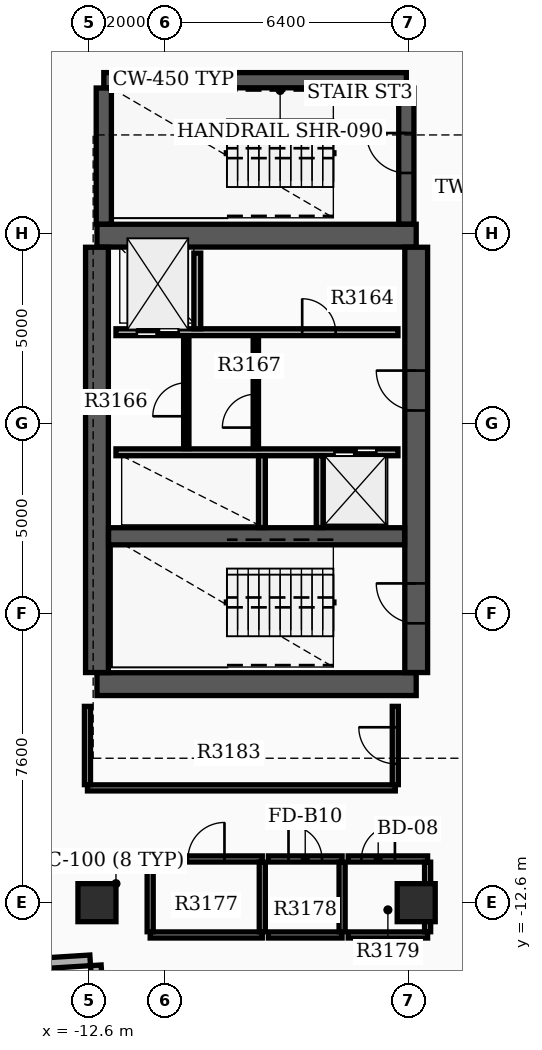
"""IFC4 building model, lengths in metres.
Left out: names, types, materials, properties, quantities, classifications, styles, units other than length and angle.
Written with IfcOpenShell. Run it as: python <this file> out.ifc"""

import sys

from ifc_helpers import new_model, si_unit, direction, frame, frame_2d, origin, origin_2d, place, context, subcontext, project, spatial, rectangle, extrude, element, fill, save


model = new_model("IFC4")
c1 = context("Model", 3, precision=1e-05, world=origin(), true_north=direction((0.0, 1.0)))
c2 = subcontext(c1, "Body", "Model", "MODEL_VIEW")
j1 = project(units=[si_unit("LENGTHUNIT", "METRE"), si_unit("PLANEANGLEUNIT", "RADIAN")], contexts=[c1])
p1 = place(None, origin())
s1 = spatial("IfcSite", under=j1, at=p1, CompositionType="ELEMENT")
p2 = place(p1, origin())
s2 = spatial("IfcBuilding", under=s1, at=p2, CompositionType="ELEMENT")
p3 = place(p2, frame((0.0, 0.0, 201.3)))
s3 = spatial("IfcBuildingStorey", under=s2, at=p3, CompositionType="ELEMENT", Elevation=201.3)
for number, where, z_axis, x_axis in (
    (1, (-12.4, -6.85, 0.0), (0.0, 0.0, 1.0), (1.0, 0.0, 0.0)),
    (2, (-12.4, 4.95, 0.0), (0.0, 0.0, 1.0), (1.0, 0.0, 0.0)),
):
    element("IfcWall", number, at=place(p3, frame(where, z_axis=z_axis, x_axis=x_axis)), inside=s3, PredefinedType="SHEAR", context=c2, shape_type="SweptSolid", body=[
        extrude(rectangle(XDim=8.4, YDim=0.6, at=frame_2d((4.2, 0.0))), origin(), (0.0, 0.0, 1.0), 3.7),
    ])
p4 = place(p3, frame((-12.4, -6.545, 0.0), z_axis=(0.0, 0.0, 1.0), x_axis=(0.0, 1.0, 0.0)))
e3 = element("IfcWall", 3, at=p4, inside=s3, PredefinedType="SHEAR", context=c2, shape_type="SweptSolid", body=[
    extrude(rectangle(XDim=11.19, YDim=0.6, at=frame_2d((5.595, 0.0))), origin(), (0.0, 0.0, 1.0), 3.7),
])
p5 = place(p3, frame((-4.0, -6.545, 0.0), z_axis=(0.0, 0.0, 1.0), x_axis=(0.0, 1.0, 0.0)))
e4 = element("IfcWall", 4, at=p5, inside=s3, PredefinedType="SHEAR", context=c2, shape_type="SweptSolid", body=[
    extrude(rectangle(XDim=11.19, YDim=0.6, at=frame_2d((5.595, 0.0))), origin(), (0.0, 0.0, 1.0), 3.7),
])
p6 = place(p5, frame((1.295, 0.0, 0.0)))
e5 = element("IfcOpeningElement", 5, at=p6, cuts=e4, PredefinedType="OPENING", context=c2, shape_type="SweptSolid", body=[
    extrude(rectangle(XDim=1.05, YDim=2.15, at=frame_2d((0.525, 1.075))), frame((0.0, 0.31, 0.0), z_axis=(0.0, -1.0, 0.0), x_axis=(1.0, 0.0, 0.0)), (0.0, 0.0, 1.0), 0.62),
])
p7 = place(p5, frame((6.895, 0.0, 0.0)))
e6 = element("IfcOpeningElement", 6, at=p7, cuts=e4, PredefinedType="OPENING", context=c2, shape_type="SweptSolid", body=[
    extrude(rectangle(XDim=1.05, YDim=2.15, at=frame_2d((0.525, 1.075))), frame((0.0, 0.31, 0.0), z_axis=(0.0, -1.0, 0.0), x_axis=(1.0, 0.0, 0.0)), (0.0, 0.0, 1.0), 0.62),
])
p8 = place(p3, frame((-12.095, -2.96, 0.0), z_axis=(0.0, 0.0, 1.0), x_axis=(1.0, 0.0, 0.0)))
e7 = element("IfcWall", 7, at=p8, inside=s3, PredefinedType="SHEAR", context=c2, shape_type="SweptSolid", body=[
    extrude(rectangle(XDim=7.79, YDim=0.45, at=frame_2d((3.895, 0.0))), origin(), (0.0, 0.0, 1.0), 3.7),
])
p9 = place(p3, frame((-12.22, 9.04, 0.0), z_axis=(0.0, 0.0, 1.0), x_axis=(1.0, 0.0, 0.0)))
e8 = element("IfcWall", 8, at=p9, inside=s3, PredefinedType="SHEAR", context=c2, shape_type="SweptSolid", body=[
    extrude(rectangle(XDim=7.96, YDim=0.4, at=frame_2d((3.98, 0.0))), origin(), (0.0, 0.0, 1.0), 3.7),
])
p10 = place(p3, frame((-12.22, 5.255, 0.0), z_axis=(0.0, 0.0, 1.0), x_axis=(0.0, 1.0, 0.0)))
e9 = element("IfcWall", 9, at=p10, inside=s3, PredefinedType="SHEAR", context=c2, shape_type="SweptSolid", body=[
    extrude(rectangle(XDim=3.58, YDim=0.4, at=frame_2d((1.79, 0.0))), origin(), (0.0, 0.0, 1.0), 3.7),
])
p11 = place(p3, frame((-4.26, 5.255, 0.0), z_axis=(0.0, 0.0, 1.0), x_axis=(0.0, 1.0, 0.0)))
e10 = element("IfcWall", 10, at=p11, inside=s3, PredefinedType="SHEAR", context=c2, shape_type="SweptSolid", body=[
    extrude(rectangle(XDim=3.58, YDim=0.4, at=frame_2d((1.79, 0.0))), origin(), (0.0, 0.0, 1.0), 3.7),
])
p12 = place(p11, frame((1.345, 0.0, 0.0)))
e11 = element("IfcOpeningElement", 11, at=p12, cuts=e10, PredefinedType="OPENING", context=c2, shape_type="SweptSolid", body=[
    extrude(rectangle(XDim=1.05, YDim=2.15, at=frame_2d((0.525, 1.075))), frame((0.0, 0.21, 0.0), z_axis=(0.0, -1.0, 0.0), x_axis=(1.0, 0.0, 0.0)), (0.0, 0.0, 1.0), 0.42),
])
for number, where, z_axis, x_axis in (
    (12, (-12.4, -12.6, 0.0), (0.0, 0.0, 1.0), (1.0, 0.0, 0.0)),
    (13, (-4.0, -12.6, 0.0), (0.0, 0.0, 1.0), (1.0, 0.0, 0.0)),
):
    element("IfcColumn", number, at=place(p3, frame(where, z_axis=z_axis, x_axis=x_axis)), inside=s3, PredefinedType="COLUMN", context=c2, shape_type="SweptSolid", body=[
        extrude(rectangle(XDim=1.0, YDim=1.0, at=origin_2d()), origin(), (0.0, 0.0, 1.0), 3.9),
    ])
p13 = place(p3, frame((-13.796, -14.194, 0.0), z_axis=(0.0, 0.0, 1.0), x_axis=(0.998023660242, 0.06283926796, 0.0)))
e14 = element("IfcWall", 14, at=p13, inside=s3, PredefinedType="STANDARD", context=c2, shape_type="SweptSolid", body=[
    extrude(rectangle(XDim=1.22, YDim=0.28, at=frame_2d((0.61, 0.0))), origin(), (0.0, 0.0, 1.0), 3.18),
])
p14 = place(p3, frame((-12.43, -14.249, 0.0), z_axis=(0.0, 0.0, 1.0), x_axis=(0.062824119533, -0.998024613927, 0.0)))
e15 = element("IfcWall", 15, at=p14, inside=s3, PredefinedType="STANDARD", context=c2, shape_type="SweptSolid", body=[
    extrude(rectangle(XDim=1.5, YDim=0.28, at=frame_2d((0.75, 0.0))), origin(), (0.0, 0.0, 1.0), 3.18),
])
p15 = place(p3, frame((-11.9, 2.41, 0.0), z_axis=(0.0, 0.0, 1.0), x_axis=(1.0, 0.0, 0.0)))
e16 = element("IfcWall", 16, at=p15, inside=s3, PredefinedType="SOLIDWALL", context=c2, shape_type="SweptSolid", body=[
    extrude(rectangle(XDim=7.42, YDim=0.18, at=frame_2d((3.71, 0.0))), origin(), (0.0, 0.0, 1.0), 3.17),
])
p16 = place(p15, frame((0.55, 0.0, 0.0)))
e17 = element("IfcOpeningElement", 17, at=p16, cuts=e16, PredefinedType="OPENING", context=c2, shape_type="SweptSolid", body=[
    extrude(rectangle(XDim=1.1, YDim=2.15, at=frame_2d((0.55, 1.075))), frame((0.0, 0.1, 0.0), z_axis=(0.0, -1.0, 0.0), x_axis=(1.0, 0.0, 0.0)), (0.0, 0.0, 1.0), 0.2),
])
p17 = place(p15, frame((4.9, 0.0, 0.0)))
e18 = element("IfcOpeningElement", 18, at=p17, cuts=e16, PredefinedType="OPENING", context=c2, shape_type="SweptSolid", body=[
    extrude(rectangle(XDim=0.88, YDim=2.1, at=frame_2d((0.44, 1.05))), frame((0.0, 0.1, 0.0), z_axis=(0.0, -1.0, 0.0), x_axis=(1.0, 0.0, 0.0)), (0.0, 0.0, 1.0), 0.2),
])
p18 = place(p3, frame((-11.9, -0.75, 0.0), z_axis=(0.0, 0.0, 1.0), x_axis=(1.0, 0.0, 0.0)))
e19 = element("IfcWall", 19, at=p18, inside=s3, PredefinedType="SOLIDWALL", context=c2, shape_type="SweptSolid", body=[
    extrude(rectangle(XDim=7.42, YDim=0.18, at=frame_2d((3.71, 0.0))), origin(), (0.0, 0.0, 1.0), 3.17),
])
p19 = place(p18, frame((5.75, 0.0, 0.0)))
e20 = element("IfcOpeningElement", 20, at=p19, cuts=e19, PredefinedType="OPENING", context=c2, shape_type="SweptSolid", body=[
    extrude(rectangle(XDim=1.1, YDim=2.15, at=frame_2d((0.55, 1.075))), frame((0.0, 0.1, 0.0), z_axis=(0.0, -1.0, 0.0), x_axis=(1.0, 0.0, 0.0)), (0.0, 0.0, 1.0), 0.2),
])
p20 = place(p3, frame((-9.76, 2.5, 0.0), z_axis=(0.0, 0.0, 1.0), x_axis=(0.0, 1.0, 0.0)))
e21 = element("IfcWall", 21, at=p20, inside=s3, PredefinedType="SOLIDWALL", context=c2, shape_type="SweptSolid", body=[
    extrude(rectangle(XDim=1.99, YDim=0.18, at=frame_2d((0.995, 0.0))), origin(), (0.0, 0.0, 1.0), 3.17),
])
for number, where, z_axis, x_axis in (
    (22, (-8.06, -2.73, 0.0), (0.0, 0.0, 1.0), (0.0, 1.0, 0.0)),
    (23, (-6.54, -2.73, 0.0), (0.0, 0.0, 1.0), (0.0, 1.0, 0.0)),
):
    element("IfcWall", number, at=place(p3, frame(where, z_axis=z_axis, x_axis=x_axis)), inside=s3, PredefinedType="SOLIDWALL", context=c2, shape_type="SweptSolid", body=[
        extrude(rectangle(XDim=1.89, YDim=0.18, at=frame_2d((0.945, 0.0))), origin(), (0.0, 0.0, 1.0), 3.17),
    ])
p21 = place(p3, frame((-8.22, -0.65, 0.0), z_axis=(0.0, 0.0, 1.0), x_axis=(0.0, 1.0, 0.0)))
e24 = element("IfcWall", 24, at=p21, inside=s3, PredefinedType="SOLIDWALL", context=c2, shape_type="SweptSolid", body=[
    extrude(rectangle(XDim=2.96, YDim=0.14, at=frame_2d((1.48, 0.0))), origin(), (0.0, 0.0, 1.0), 3.17),
])
p22 = place(p21, frame((0.55, 0.0, 0.0)))
e25 = element("IfcOpeningElement", 25, at=p22, cuts=e24, PredefinedType="OPENING", context=c2, shape_type="SweptSolid", body=[
    extrude(rectangle(XDim=0.88, YDim=2.1, at=frame_2d((0.44, 1.05))), frame((0.0, 0.08, 0.0), z_axis=(0.0, -1.0, 0.0), x_axis=(1.0, 0.0, 0.0)), (0.0, 0.0, 1.0), 0.16),
])
p23 = place(p3, frame((-10.05, -0.652, 0.0), z_axis=(0.0, 0.0, 1.0), x_axis=(0.0, 1.0, 0.0)))
e26 = element("IfcWall", 26, at=p23, inside=s3, PredefinedType="PARTITIONING", context=c2, shape_type="SweptSolid", body=[
    extrude(rectangle(XDim=2.962, YDim=0.14, at=frame_2d((1.481, 0.0))), origin(), (0.0, 0.0, 1.0), 3.17),
])
p24 = place(p23, frame((0.85, 0.0, 0.0)))
e27 = element("IfcOpeningElement", 27, at=p24, cuts=e26, PredefinedType="OPENING", context=c2, shape_type="SweptSolid", body=[
    extrude(rectangle(XDim=0.88, YDim=2.1, at=frame_2d((0.44, 1.05))), frame((0.0, 0.08, 0.0), z_axis=(0.0, -1.0, 0.0), x_axis=(1.0, 0.0, 0.0)), (0.0, 0.0, 1.0), 0.16),
])
p25 = place(p3, frame((-11.0, -13.45, 0.0), z_axis=(0.0, 0.0, 1.0), x_axis=(1.0, 0.0, 0.0)))
e28 = element("IfcWall", 28, at=p25, inside=s3, PredefinedType="PARTITIONING", context=c2, shape_type="SweptSolid", body=[
    extrude(rectangle(XDim=2.95, YDim=0.16, at=frame_2d((1.475, 0.0))), origin(), (0.0, 0.0, 1.0), 3.17),
])
p26 = place(p3, frame((-11.0, -11.45, 0.0), z_axis=(0.0, 0.0, 1.0), x_axis=(1.0, 0.0, 0.0)))
e29 = element("IfcWall", 29, at=p26, inside=s3, PredefinedType="PARTITIONING", context=c2, shape_type="SweptSolid", body=[
    extrude(rectangle(XDim=2.95, YDim=0.16, at=frame_2d((1.475, 0.0))), origin(), (0.0, 0.0, 1.0), 3.17),
])
p27 = place(p26, frame((0.995, 0.0, 0.0)))
e30 = element("IfcOpeningElement", 30, at=p27, cuts=e29, PredefinedType="OPENING", context=c2, shape_type="SweptSolid", body=[
    extrude(rectangle(XDim=0.96, YDim=2.15, at=frame_2d((0.48, 1.075))), frame((0.0, 0.09, 0.0), z_axis=(0.0, -1.0, 0.0), x_axis=(1.0, 0.0, 0.0)), (0.0, 0.0, 1.0), 0.18),
])
for number, where, z_axis, x_axis in (
    (31, (-11.0, -13.365, 0.0), (0.0, 0.0, 1.0), (0.0, 1.0, 0.0)),
    (32, (-8.05, -13.365, 0.0), (0.0, 0.0, 1.0), (0.0, 1.0, 0.0)),
):
    element("IfcWall", number, at=place(p3, frame(where, z_axis=z_axis, x_axis=x_axis)), inside=s3, PredefinedType="PARTITIONING", context=c2, shape_type="SweptSolid", body=[
        extrude(rectangle(XDim=1.83, YDim=0.16, at=frame_2d((0.915, 0.0))), origin(), (0.0, 0.0, 1.0), 3.17),
    ])
p28 = place(p3, frame((-7.89, -13.45, 0.0), z_axis=(0.0, 0.0, 1.0), x_axis=(1.0, 0.0, 0.0)))
e33 = element("IfcWall", 33, at=p28, inside=s3, PredefinedType="PARTITIONING", context=c2, shape_type="SweptSolid", body=[
    extrude(rectangle(XDim=1.94, YDim=0.16, at=frame_2d((0.97, 0.0))), origin(), (0.0, 0.0, 1.0), 3.17),
])
p29 = place(p3, frame((-7.89, -11.45, 0.0), z_axis=(0.0, 0.0, 1.0), x_axis=(1.0, 0.0, 0.0)))
e34 = element("IfcWall", 34, at=p29, inside=s3, PredefinedType="PARTITIONING", context=c2, shape_type="SweptSolid", body=[
    extrude(rectangle(XDim=1.94, YDim=0.16, at=frame_2d((0.97, 0.0))), origin(), (0.0, 0.0, 1.0), 3.17),
])
p30 = place(p29, frame((0.53, 0.0, 0.0)))
e35 = element("IfcOpeningElement", 35, at=p30, cuts=e34, PredefinedType="OPENING", context=c2, shape_type="SweptSolid", body=[
    extrude(rectangle(XDim=0.88, YDim=2.1, at=frame_2d((0.44, 1.05))), frame((0.0, 0.09, 0.0), z_axis=(0.0, -1.0, 0.0), x_axis=(1.0, 0.0, 0.0)), (0.0, 0.0, 1.0), 0.18),
])
p31 = place(p3, frame((-5.95, -13.365, 0.0), z_axis=(0.0, 0.0, 1.0), x_axis=(0.0, 1.0, 0.0)))
e36 = element("IfcWall", 36, at=p31, inside=s3, PredefinedType="PARTITIONING", context=c2, shape_type="SweptSolid", body=[
    extrude(rectangle(XDim=1.83, YDim=0.16, at=frame_2d((0.915, 0.0))), origin(), (0.0, 0.0, 1.0), 3.17),
])
p32 = place(p3, frame((-5.79, -13.45, 0.0), z_axis=(0.0, 0.0, 1.0), x_axis=(1.0, 0.0, 0.0)))
e37 = element("IfcWall", 37, at=p32, inside=s3, PredefinedType="PARTITIONING", context=c2, shape_type="SweptSolid", body=[
    extrude(rectangle(XDim=2.09, YDim=0.16, at=frame_2d((1.045, 0.0))), origin(), (0.0, 0.0, 1.0), 3.17),
])
p33 = place(p3, frame((-5.79, -11.45, 0.0), z_axis=(0.0, 0.0, 1.0), x_axis=(1.0, 0.0, 0.0)))
e38 = element("IfcWall", 38, at=p33, inside=s3, PredefinedType="PARTITIONING", context=c2, shape_type="SweptSolid", body=[
    extrude(rectangle(XDim=2.09, YDim=0.16, at=frame_2d((1.045, 0.0))), origin(), (0.0, 0.0, 1.0), 3.17),
])
p34 = place(p33, frame((0.35, 0.0, 0.0)))
e39 = element("IfcOpeningElement", 39, at=p34, cuts=e38, PredefinedType="OPENING", context=c2, shape_type="SweptSolid", body=[
    extrude(rectangle(XDim=0.88, YDim=2.15, at=frame_2d((0.44, 1.075))), frame((0.0, 0.09, 0.0), z_axis=(0.0, -1.0, 0.0), x_axis=(1.0, 0.0, 0.0)), (0.0, 0.0, 1.0), 0.18),
])
p35 = place(p3, frame((-3.7, -13.365, 0.0), z_axis=(0.0, 0.0, 1.0), x_axis=(0.0, 1.0, 0.0)))
e40 = element("IfcWall", 40, at=p35, inside=s3, PredefinedType="PARTITIONING", context=c2, shape_type="SweptSolid", body=[
    extrude(rectangle(XDim=1.83, YDim=0.16, at=frame_2d((0.915, 0.0))), origin(), (0.0, 0.0, 1.0), 3.17),
])
p36 = place(p3, frame((-12.65, -9.58, 0.0), z_axis=(0.0, 0.0, 1.0), x_axis=(1.0, 0.0, 0.0)))
e41 = element("IfcWall", 41, at=p36, inside=s3, PredefinedType="PARTITIONING", context=c2, shape_type="SweptSolid", body=[
    extrude(rectangle(XDim=8.1, YDim=0.16, at=frame_2d((4.05, 0.0))), origin(), (0.0, 0.0, 1.0), 3.17),
])
p37 = place(p3, frame((-12.65, -9.495, 0.0), z_axis=(0.0, 0.0, 1.0), x_axis=(0.0, 1.0, 0.0)))
e42 = element("IfcWall", 42, at=p37, inside=s3, PredefinedType="PARTITIONING", context=c2, shape_type="SweptSolid", body=[
    extrude(rectangle(XDim=2.06, YDim=0.16, at=frame_2d((1.03, 0.0))), origin(), (0.0, 0.0, 1.0), 3.17),
])
p38 = place(p3, frame((-4.55, -9.495, 0.0), z_axis=(0.0, 0.0, 1.0), x_axis=(0.0, 1.0, 0.0)))
e43 = element("IfcWall", 43, at=p38, inside=s3, PredefinedType="PARTITIONING", context=c2, shape_type="SweptSolid", body=[
    extrude(rectangle(XDim=2.06, YDim=0.16, at=frame_2d((1.03, 0.0))), origin(), (0.0, 0.0, 1.0), 3.17),
])
p39 = place(p38, frame((0.55, 0.0, 0.0)))
e44 = element("IfcOpeningElement", 44, at=p39, cuts=e43, PredefinedType="OPENING", context=c2, shape_type="SweptSolid", body=[
    extrude(rectangle(XDim=0.96, YDim=2.15, at=frame_2d((0.48, 1.075))), frame((0.0, 0.09, 0.0), z_axis=(0.0, -1.0, 0.0), x_axis=(1.0, 0.0, 0.0)), (0.0, 0.0, 1.0), 0.18),
])
p40 = place(p6, origin())
e45 = element("IfcDoor", 45, at=p40, inside=s3, OperationType="SINGLE_SWING_RIGHT", PredefinedType="DOOR", context=c2, shape_type="SweptSolid", body=[
    extrude(rectangle(XDim=1.05, YDim=2.15, at=frame_2d((0.525, 1.075))), frame((0.0, 0.025, 0.0), z_axis=(0.0, -1.0, 0.0), x_axis=(1.0, 0.0, 0.0)), (0.0, 0.0, 1.0), 0.05),
])
fill(e5, e45)
p41 = place(p7, origin())
e46 = element("IfcDoor", 46, at=p41, inside=s3, OperationType="SINGLE_SWING_RIGHT", PredefinedType="DOOR", context=c2, shape_type="SweptSolid", body=[
    extrude(rectangle(XDim=1.05, YDim=2.15, at=frame_2d((0.525, 1.075))), frame((0.0, 0.025, 0.0), z_axis=(0.0, -1.0, 0.0), x_axis=(1.0, 0.0, 0.0)), (0.0, 0.0, 1.0), 0.05),
])
fill(e6, e46)
p42 = place(p12, origin())
e47 = element("IfcDoor", 47, at=p42, inside=s3, OperationType="SINGLE_SWING_RIGHT", PredefinedType="DOOR", context=c2, shape_type="SweptSolid", body=[
    extrude(rectangle(XDim=1.05, YDim=2.15, at=frame_2d((0.525, 1.075))), frame((0.0, 0.025, 0.0), z_axis=(0.0, -1.0, 0.0), x_axis=(1.0, 0.0, 0.0)), (0.0, 0.0, 1.0), 0.05),
])
fill(e11, e47)
p43 = place(p16, origin())
e48 = element("IfcDoor", 48, at=p43, inside=s3, OperationType="DOUBLE_DOOR_SLIDING", PredefinedType="DOOR", context=c2, shape_type="SweptSolid", body=[
    extrude(rectangle(XDim=1.1, YDim=2.15, at=frame_2d((0.55, 1.075))), frame((0.0, 0.025, 0.0), z_axis=(0.0, -1.0, 0.0), x_axis=(1.0, 0.0, 0.0)), (0.0, 0.0, 1.0), 0.05),
])
fill(e17, e48)
p44 = place(p19, origin())
e49 = element("IfcDoor", 49, at=p44, inside=s3, OperationType="DOUBLE_DOOR_SLIDING", PredefinedType="DOOR", context=c2, shape_type="SweptSolid", body=[
    extrude(rectangle(XDim=1.1, YDim=2.15, at=frame_2d((0.55, 1.075))), frame((0.0, 0.025, 0.0), z_axis=(0.0, -1.0, 0.0), x_axis=(1.0, 0.0, 0.0)), (0.0, 0.0, 1.0), 0.05),
])
fill(e20, e49)
p45 = place(p17, origin())
e50 = element("IfcDoor", 50, at=p45, inside=s3, OperationType="SINGLE_SWING_LEFT", PredefinedType="DOOR", context=c2, shape_type="SweptSolid", body=[
    extrude(rectangle(XDim=0.88, YDim=2.1, at=frame_2d((0.44, 1.05))), frame((0.0, 0.025, 0.0), z_axis=(0.0, -1.0, 0.0), x_axis=(1.0, 0.0, 0.0)), (0.0, 0.0, 1.0), 0.05),
])
fill(e18, e50)
p46 = place(p22, origin())
e51 = element("IfcDoor", 51, at=p46, inside=s3, OperationType="SINGLE_SWING_LEFT", PredefinedType="DOOR", context=c2, shape_type="SweptSolid", body=[
    extrude(rectangle(XDim=0.88, YDim=2.1, at=frame_2d((0.44, 1.05))), frame((0.0, 0.025, 0.0), z_axis=(0.0, -1.0, 0.0), x_axis=(1.0, 0.0, 0.0)), (0.0, 0.0, 1.0), 0.05),
])
fill(e25, e51)
p47 = place(p24, origin())
e52 = element("IfcDoor", 52, at=p47, inside=s3, OperationType="SINGLE_SWING_LEFT", PredefinedType="DOOR", context=c2, shape_type="SweptSolid", body=[
    extrude(rectangle(XDim=0.88, YDim=2.1, at=frame_2d((0.44, 1.05))), frame((0.0, 0.025, 0.0), z_axis=(0.0, -1.0, 0.0), x_axis=(1.0, 0.0, 0.0)), (0.0, 0.0, 1.0), 0.05),
])
fill(e27, e52)
p48 = place(p27, origin())
e53 = element("IfcDoor", 53, at=p48, inside=s3, OperationType="SINGLE_SWING_RIGHT", PredefinedType="DOOR", context=c2, shape_type="SweptSolid", body=[
    extrude(rectangle(XDim=0.96, YDim=2.15, at=frame_2d((0.48, 1.075))), frame((0.0, 0.025, 0.0), z_axis=(0.0, -1.0, 0.0), x_axis=(1.0, 0.0, 0.0)), (0.0, 0.0, 1.0), 0.05),
])
fill(e30, e53)
p49 = place(p30, origin())
e54 = element("IfcDoor", 54, at=p49, inside=s3, OperationType="SINGLE_SWING_LEFT", PredefinedType="DOOR", context=c2, shape_type="SweptSolid", body=[
    extrude(rectangle(XDim=0.88, YDim=2.1, at=frame_2d((0.44, 1.05))), frame((0.0, 0.025, 0.0), z_axis=(0.0, -1.0, 0.0), x_axis=(1.0, 0.0, 0.0)), (0.0, 0.0, 1.0), 0.05),
])
fill(e35, e54)
p50 = place(p34, origin())
e55 = element("IfcDoor", 55, at=p50, inside=s3, OperationType="SINGLE_SWING_RIGHT", PredefinedType="DOOR", context=c2, shape_type="SweptSolid", body=[
    extrude(rectangle(XDim=0.88, YDim=2.15, at=frame_2d((0.44, 1.075))), frame((0.0, 0.025, 0.0), z_axis=(0.0, -1.0, 0.0), x_axis=(1.0, 0.0, 0.0)), (0.0, 0.0, 1.0), 0.05),
])
fill(e39, e55)
p51 = place(p39, origin())
e56 = element("IfcDoor", 56, at=p51, inside=s3, OperationType="SINGLE_SWING_RIGHT", PredefinedType="DOOR", context=c2, shape_type="SweptSolid", body=[
    extrude(rectangle(XDim=0.96, YDim=2.15, at=frame_2d((0.48, 1.075))), frame((0.0, 0.025, 0.0), z_axis=(0.0, -1.0, 0.0), x_axis=(1.0, 0.0, 0.0)), (0.0, 0.0, 1.0), 0.05),
])
fill(e44, e56)
save(model, sys.argv[1])
